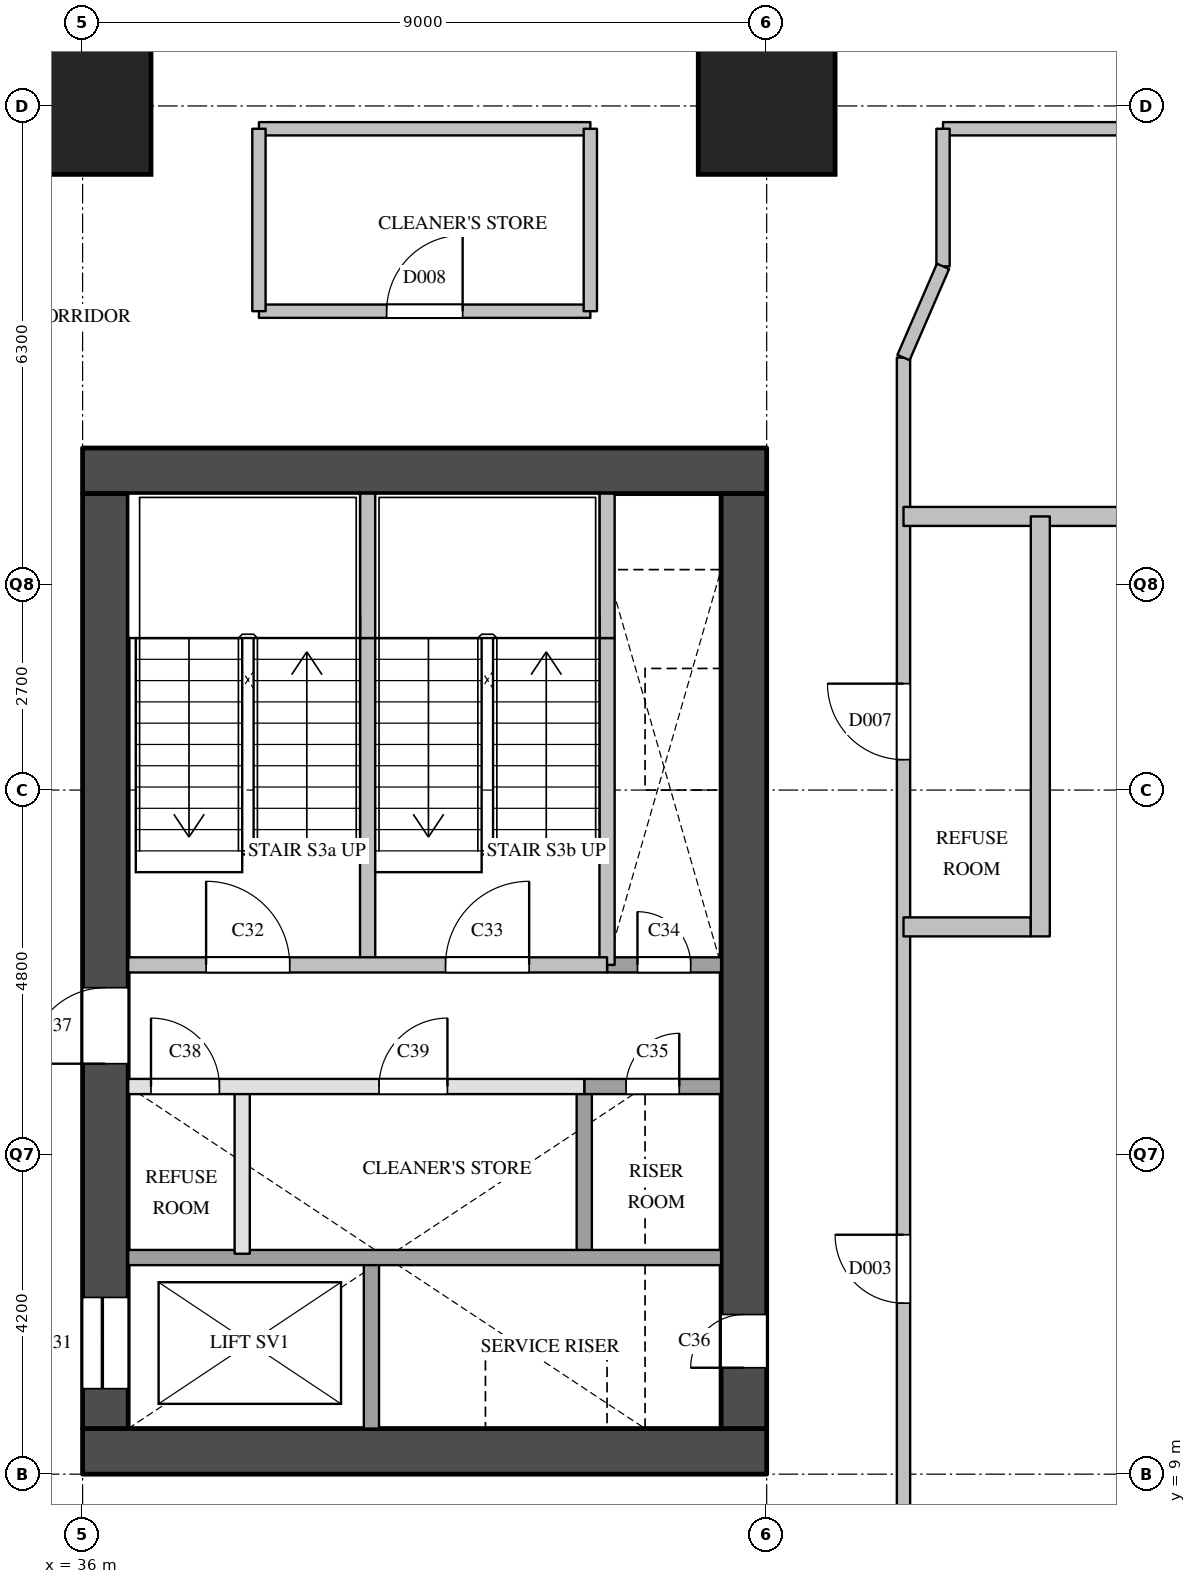
"""IFC4 building model, lengths in metres.
Left out: names, types, materials, properties, quantities, classifications, styles, units other than length and angle.
Written with IfcOpenShell. Run it as: python <this file> out.ifc"""

import sys

from ifc_helpers import new_model, si_unit, direction, frame, frame_2d, origin, origin_2d, place, context, subcontext, project, spatial, rectangle, extrude, element, fill, save


model = new_model("IFC4")
c1 = context("Model", 3, precision=1e-05, world=origin(), true_north=direction((0.0, 1.0)))
c2 = subcontext(c1, "Body", "Model", "MODEL_VIEW")
j1 = project(units=[si_unit("LENGTHUNIT", "METRE"), si_unit("PLANEANGLEUNIT", "RADIAN")], contexts=[c1])
p1 = place(None, origin())
s1 = spatial("IfcSite", under=j1, at=p1, CompositionType="ELEMENT")
p2 = place(p1, origin())
s2 = spatial("IfcBuilding", under=s1, at=p2, CompositionType="ELEMENT")
p3 = place(p2, frame((0.0, 0.0, 89.2)))
s3 = spatial("IfcBuildingStorey", under=s2, at=p3, CompositionType="ELEMENT", Elevation=89.2)
for number, where, z_axis, x_axis in (
    (1, (36.0, 27.0, 0.0), (0.0, 0.0, 1.0), (1.0, 0.0, 0.0)),
    (2, (45.0, 27.0, 0.0), (0.0, 0.0, 1.0), (1.0, 0.0, 0.0)),
):
    element("IfcColumn", number, at=place(p3, frame(where, z_axis=z_axis, x_axis=x_axis)), inside=s3, PredefinedType="COLUMN", context=c2, shape_type="SweptSolid", body=[
        extrude(rectangle(XDim=1.8, YDim=1.8, at=origin_2d()), origin(), (0.0, 0.0, 1.0), 3.8),
    ])
for number, where, z_axis, x_axis in (
    (3, (36.0, 9.3, 0.0), (0.0, 0.0, 1.0), (1.0, 0.0, 0.0)),
    (4, (36.0, 22.2, 0.0), (0.0, 0.0, 1.0), (1.0, 0.0, 0.0)),
):
    element("IfcWall", number, at=place(p3, frame(where, z_axis=z_axis, x_axis=x_axis)), inside=s3, PredefinedType="SHEAR", context=c2, shape_type="SweptSolid", body=[
        extrude(rectangle(XDim=9.0, YDim=0.6, at=frame_2d((4.5, 0.0))), origin(), (0.0, 0.0, 1.0), 3.5),
    ])
p4 = place(p3, frame((36.3, 9.6, 0.0), z_axis=(0.0, 0.0, 1.0), x_axis=(0.0, 1.0, 0.0)))
e5 = element("IfcWall", 5, at=p4, inside=s3, PredefinedType="SHEAR", context=c2, shape_type="SweptSolid", body=[
    extrude(rectangle(XDim=12.3, YDim=0.6, at=frame_2d((6.15, 0.0))), origin(), (0.0, 0.0, 1.0), 3.5),
])
p5 = place(p4, frame((0.525, 0.0, 0.0)))
e6 = element("IfcOpeningElement", 6, at=p5, cuts=e5, PredefinedType="OPENING", context=c2, shape_type="SweptSolid", body=[
    extrude(rectangle(XDim=1.2, YDim=2.1, at=frame_2d((0.6, 1.05))), frame((0.0, 0.31, 0.0), z_axis=(0.0, -1.0, 0.0), x_axis=(1.0, 0.0, 0.0)), (0.0, 0.0, 1.0), 0.62),
])
p6 = place(p4, frame((4.8, 0.0, 0.0)))
e7 = element("IfcOpeningElement", 7, at=p6, cuts=e5, PredefinedType="OPENING", context=c2, shape_type="SweptSolid", body=[
    extrude(rectangle(XDim=1.0, YDim=2.1, at=frame_2d((0.5, 1.05))), frame((0.0, 0.31, 0.0), z_axis=(0.0, -1.0, 0.0), x_axis=(1.0, 0.0, 0.0)), (0.0, 0.0, 1.0), 0.62),
])
p7 = place(p3, frame((44.7, 9.6, 0.0), z_axis=(0.0, 0.0, 1.0), x_axis=(0.0, 1.0, 0.0)))
e8 = element("IfcWall", 8, at=p7, inside=s3, PredefinedType="SHEAR", context=c2, shape_type="SweptSolid", body=[
    extrude(rectangle(XDim=12.3, YDim=0.6, at=frame_2d((6.15, 0.0))), origin(), (0.0, 0.0, 1.0), 3.5),
])
p8 = place(p7, frame((0.8, 0.0, 0.0)))
e9 = element("IfcOpeningElement", 9, at=p8, cuts=e8, PredefinedType="OPENING", context=c2, shape_type="SweptSolid", body=[
    extrude(rectangle(XDim=0.7, YDim=2.1, at=frame_2d((0.35, 1.05))), frame((0.0, 0.31, 0.0), z_axis=(0.0, -1.0, 0.0), x_axis=(1.0, 0.0, 0.0)), (0.0, 0.0, 1.0), 0.62),
])
p9 = place(p3, frame((38.1, 11.9, 0.0), z_axis=(0.0, 0.0, 1.0), x_axis=(0.0, 1.0, 0.0)))
e10 = element("IfcWall", 10, at=p9, inside=s3, PredefinedType="PARTITIONING", context=c2, shape_type="SweptSolid", body=[
    extrude(rectangle(XDim=2.2, YDim=0.2, at=frame_2d((1.1, 0.0))), origin(), (0.0, 0.0, 1.0), 3.5),
])
p10 = place(p3, frame((39.75, 15.7, 0.0), z_axis=(0.0, 0.0, 1.0), x_axis=(0.0, 1.0, 0.0)))
e11 = element("IfcWall", 11, at=p10, inside=s3, PredefinedType="SOLIDWALL", context=c2, shape_type="SweptSolid", body=[
    extrude(rectangle(XDim=4.3, YDim=0.2, at=frame_2d((2.15, 0.0))), origin(), (0.0, 0.0, 1.0), 3.5),
])
p11 = place(p3, frame((39.75, 20.0, 0.0), z_axis=(0.0, 0.0, 1.0), x_axis=(0.0, 1.0, 0.0)))
e12 = element("IfcWall", 12, at=p11, inside=s3, PredefinedType="SOLIDWALL", context=c2, shape_type="SweptSolid", body=[
    extrude(rectangle(XDim=1.9, YDim=0.2, at=frame_2d((0.95, 0.0))), origin(), (0.0, 0.0, 1.0), 3.5),
])
p12 = place(p3, frame((39.8, 9.6, 0.0), z_axis=(0.0, 0.0, 1.0), x_axis=(0.0, 1.0, 0.0)))
e13 = element("IfcWall", 13, at=p12, inside=s3, PredefinedType="SOLIDWALL", context=c2, shape_type="SweptSolid", body=[
    extrude(rectangle(XDim=2.3, YDim=0.2, at=frame_2d((1.15, 0.0))), origin(), (0.0, 0.0, 1.0), 3.5),
])
p13 = place(p3, frame((42.6, 11.9, 0.0), z_axis=(0.0, 0.0, 1.0), x_axis=(0.0, 1.0, 0.0)))
e14 = element("IfcWall", 14, at=p13, inside=s3, PredefinedType="SOLIDWALL", context=c2, shape_type="SweptSolid", body=[
    extrude(rectangle(XDim=2.2, YDim=0.2, at=frame_2d((1.1, 0.0))), origin(), (0.0, 0.0, 1.0), 3.5),
])
p14 = place(p3, frame((42.9, 15.7, 0.0), z_axis=(0.0, 0.0, 1.0), x_axis=(0.0, 1.0, 0.0)))
e15 = element("IfcWall", 15, at=p14, inside=s3, PredefinedType="SOLIDWALL", context=c2, shape_type="SweptSolid", body=[
    extrude(rectangle(XDim=4.3, YDim=0.2, at=frame_2d((2.15, 0.0))), origin(), (0.0, 0.0, 1.0), 3.5),
])
p15 = place(p3, frame((42.9, 20.0, 0.0), z_axis=(0.0, 0.0, 1.0), x_axis=(0.0, 1.0, 0.0)))
e16 = element("IfcWall", 16, at=p15, inside=s3, PredefinedType="SOLIDWALL", context=c2, shape_type="SweptSolid", body=[
    extrude(rectangle(XDim=1.9, YDim=0.2, at=frame_2d((0.95, 0.0))), origin(), (0.0, 0.0, 1.0), 3.5),
])
p16 = place(p3, frame((36.6, 11.85, 0.0), z_axis=(0.0, 0.0, 1.0), x_axis=(1.0, 0.0, 0.0)))
e17 = element("IfcWall", 17, at=p16, inside=s3, PredefinedType="SOLIDWALL", context=c2, shape_type="SweptSolid", body=[
    extrude(rectangle(XDim=7.8, YDim=0.2, at=frame_2d((3.9, 0.0))), origin(), (0.0, 0.0, 1.0), 3.5),
])
p17 = place(p3, frame((36.6, 14.1, 0.0), z_axis=(0.0, 0.0, 1.0), x_axis=(1.0, 0.0, 0.0)))
e18 = element("IfcWall", 18, at=p17, inside=s3, PredefinedType="PARTITIONING", context=c2, shape_type="SweptSolid", body=[
    extrude(rectangle(XDim=6.0, YDim=0.2, at=frame_2d((3.0, 0.0))), origin(), (0.0, 0.0, 1.0), 3.5),
])
p18 = place(p17, frame((0.3, 0.0, 0.0)))
e19 = element("IfcOpeningElement", 19, at=p18, cuts=e18, PredefinedType="OPENING", context=c2, shape_type="SweptSolid", body=[
    extrude(rectangle(XDim=0.9, YDim=2.1, at=frame_2d((0.45, 1.05))), frame((0.0, 0.11, 0.0), z_axis=(0.0, -1.0, 0.0), x_axis=(1.0, 0.0, 0.0)), (0.0, 0.0, 1.0), 0.22),
])
p19 = place(p17, frame((3.3, 0.0, 0.0)))
e20 = element("IfcOpeningElement", 20, at=p19, cuts=e18, PredefinedType="OPENING", context=c2, shape_type="SweptSolid", body=[
    extrude(rectangle(XDim=0.9, YDim=2.1, at=frame_2d((0.45, 1.05))), frame((0.0, 0.11, 0.0), z_axis=(0.0, -1.0, 0.0), x_axis=(1.0, 0.0, 0.0)), (0.0, 0.0, 1.0), 0.22),
])
p20 = place(p3, frame((42.6, 14.1, 0.0), z_axis=(0.0, 0.0, 1.0), x_axis=(1.0, 0.0, 0.0)))
e21 = element("IfcWall", 21, at=p20, inside=s3, PredefinedType="SOLIDWALL", context=c2, shape_type="SweptSolid", body=[
    extrude(rectangle(XDim=1.8, YDim=0.2, at=frame_2d((0.9, 0.0))), origin(), (0.0, 0.0, 1.0), 3.5),
])
p21 = place(p20, frame((0.55, 0.0, 0.0)))
e22 = element("IfcOpeningElement", 22, at=p21, cuts=e21, PredefinedType="OPENING", context=c2, shape_type="SweptSolid", body=[
    extrude(rectangle(XDim=0.7, YDim=2.1, at=frame_2d((0.35, 1.05))), frame((0.0, 0.11, 0.0), z_axis=(0.0, -1.0, 0.0), x_axis=(1.0, 0.0, 0.0)), (0.0, 0.0, 1.0), 0.22),
])
p22 = place(p3, frame((42.9, 15.7, 0.0), z_axis=(0.0, 0.0, 1.0), x_axis=(1.0, 0.0, 0.0)))
e23 = element("IfcWall", 23, at=p22, inside=s3, PredefinedType="SOLIDWALL", context=c2, shape_type="SweptSolid", body=[
    extrude(rectangle(XDim=1.5, YDim=0.2, at=frame_2d((0.75, 0.0))), origin(), (0.0, 0.0, 1.0), 3.5),
])
p23 = place(p22, frame((0.4, 0.0, 0.0)))
e24 = element("IfcOpeningElement", 24, at=p23, cuts=e23, PredefinedType="OPENING", context=c2, shape_type="SweptSolid", body=[
    extrude(rectangle(XDim=0.7, YDim=2.1, at=frame_2d((0.35, 1.05))), frame((0.0, 0.11, 0.0), z_axis=(0.0, -1.0, 0.0), x_axis=(1.0, 0.0, 0.0)), (0.0, 0.0, 1.0), 0.22),
])
p24 = place(p3, frame((36.6, 15.7, 0.0), z_axis=(0.0, 0.0, 1.0), x_axis=(1.0, 0.0, 0.0)))
e25 = element("IfcWall", 25, at=p24, inside=s3, PredefinedType="SOLIDWALL", context=c2, shape_type="SweptSolid", body=[
    extrude(rectangle(XDim=6.3, YDim=0.2, at=frame_2d((3.15, 0.0))), origin(), (0.0, 0.0, 1.0), 3.5),
])
p25 = place(p24, frame((1.025, 0.0, 0.0)))
e26 = element("IfcOpeningElement", 26, at=p25, cuts=e25, PredefinedType="OPENING", context=c2, shape_type="SweptSolid", body=[
    extrude(rectangle(XDim=1.1, YDim=2.1, at=frame_2d((0.55, 1.05))), frame((0.0, 0.11, 0.0), z_axis=(0.0, -1.0, 0.0), x_axis=(1.0, 0.0, 0.0)), (0.0, 0.0, 1.0), 0.22),
])
p26 = place(p24, frame((4.175, 0.0, 0.0)))
e27 = element("IfcOpeningElement", 27, at=p26, cuts=e25, PredefinedType="OPENING", context=c2, shape_type="SweptSolid", body=[
    extrude(rectangle(XDim=1.1, YDim=2.1, at=frame_2d((0.55, 1.05))), frame((0.0, 0.11, 0.0), z_axis=(0.0, -1.0, 0.0), x_axis=(1.0, 0.0, 0.0)), (0.0, 0.0, 1.0), 0.22),
])
p27 = place(p3, frame((38.32, 24.3, 0.0), z_axis=(0.0, 0.0, 1.0), x_axis=(1.0, 0.0, 0.0)))
e28 = element("IfcWall", 28, at=p27, inside=s3, PredefinedType="PARTITIONING", context=c2, shape_type="SweptSolid", body=[
    extrude(rectangle(XDim=4.36, YDim=0.175, at=frame_2d((2.18, 0.0))), origin(), (0.0, 0.0, 1.0), 3.5),
])
p28 = place(p27, frame((1.68, 0.0, 0.0)))
e29 = element("IfcOpeningElement", 29, at=p28, cuts=e28, PredefinedType="OPENING", context=c2, shape_type="SweptSolid", body=[
    extrude(rectangle(XDim=1.0, YDim=2.1, at=frame_2d((0.5, 1.05))), frame((0.0, 0.097, 0.0), z_axis=(0.0, -1.0, 0.0), x_axis=(1.0, 0.0, 0.0)), (0.0, 0.0, 1.0), 0.195),
])
p29 = place(p3, frame((38.32, 26.7, 0.0), z_axis=(0.0, 0.0, 1.0), x_axis=(1.0, 0.0, 0.0)))
e30 = element("IfcWall", 30, at=p29, inside=s3, PredefinedType="PARTITIONING", context=c2, shape_type="SweptSolid", body=[
    extrude(rectangle(XDim=4.36, YDim=0.175, at=frame_2d((2.18, 0.0))), origin(), (0.0, 0.0, 1.0), 2.5),
])
p30 = place(p3, frame((47.32, 26.7, 0.0), z_axis=(0.0, 0.0, 1.0), x_axis=(1.0, 0.0, 0.0)))
e31 = element("IfcWall", 31, at=p30, inside=s3, PredefinedType="PARTITIONING", context=c2, shape_type="SweptSolid", body=[
    extrude(rectangle(XDim=2.88, YDim=0.175, at=frame_2d((1.44, 0.0))), origin(), (0.0, 0.0, 1.0), 2.5),
])
for number, where, z_axis, x_axis in (
    (32, (38.32, 24.3, 0.0), (0.0, 0.0, 1.0), (0.0, 1.0, 0.0)),
    (33, (42.68, 24.3, 0.0), (0.0, 0.0, 1.0), (0.0, 1.0, 0.0)),
):
    element("IfcWall", number, at=place(p3, frame(where, z_axis=z_axis, x_axis=x_axis)), inside=s3, PredefinedType="PARTITIONING", context=c2, shape_type="SweptSolid", body=[
        extrude(rectangle(XDim=2.4, YDim=0.175, at=frame_2d((1.2, 0.0))), origin(), (0.0, 0.0, 1.0), 2.5),
    ])
p31 = place(p3, frame((46.8, 7.2, 0.0), z_axis=(0.0, 0.0, 1.0), x_axis=(0.0, 1.0, 0.0)))
e34 = element("IfcWall", 34, at=p31, inside=s3, PredefinedType="PARTITIONING", context=c2, shape_type="SweptSolid", body=[
    extrude(rectangle(XDim=16.49, YDim=0.175, at=frame_2d((8.245, 0.0))), origin(), (0.0, 0.0, 1.0), 3.5),
])
p32 = place(p31, frame((4.05, 0.0, 0.0)))
e35 = element("IfcOpeningElement", 35, at=p32, cuts=e34, PredefinedType="OPENING", context=c2, shape_type="SweptSolid", body=[
    extrude(rectangle(XDim=0.9, YDim=2.1, at=frame_2d((0.45, 1.05))), frame((0.0, 0.097, 0.0), z_axis=(0.0, -1.0, 0.0), x_axis=(1.0, 0.0, 0.0)), (0.0, 0.0, 1.0), 0.195),
])
p33 = place(p31, frame((11.2, 0.0, 0.0)))
e36 = element("IfcOpeningElement", 36, at=p33, cuts=e34, PredefinedType="OPENING", context=c2, shape_type="SweptSolid", body=[
    extrude(rectangle(XDim=1.0, YDim=2.1, at=frame_2d((0.5, 1.05))), frame((0.0, 0.097, 0.0), z_axis=(0.0, -1.0, 0.0), x_axis=(1.0, 0.0, 0.0)), (0.0, 0.0, 1.0), 0.195),
])
p34 = place(p3, frame((47.32, 24.89, 0.0), z_axis=(0.0, 0.0, 1.0), x_axis=(0.0, 1.0, 0.0)))
e37 = element("IfcWall", 37, at=p34, inside=s3, PredefinedType="PARTITIONING", context=c2, shape_type="SweptSolid", body=[
    extrude(rectangle(XDim=1.81, YDim=0.175, at=frame_2d((0.905, 0.0))), origin(), (0.0, 0.0, 1.0), 2.5),
])
p35 = place(p3, frame((46.8, 16.2, 0.0), z_axis=(0.0, 0.0, 1.0), x_axis=(1.0, 0.0, 0.0)))
e38 = element("IfcWall", 38, at=p35, inside=s3, PredefinedType="PARTITIONING", context=c2, shape_type="SweptSolid", body=[
    extrude(rectangle(XDim=1.675, YDim=0.25, at=frame_2d((0.837, 0.0))), origin(), (0.0, 0.0, 1.0), 3.5),
])
p36 = place(p3, frame((46.8, 21.6, 0.0), z_axis=(0.0, 0.0, 1.0), x_axis=(1.0, 0.0, 0.0)))
e39 = element("IfcWall", 39, at=p36, inside=s3, PredefinedType="PARTITIONING", context=c2, shape_type="SweptSolid", body=[
    extrude(rectangle(XDim=7.2, YDim=0.25, at=frame_2d((3.6, 0.0))), origin(), (0.0, 0.0, 1.0), 2.5),
])
p37 = place(p3, frame((48.6, 16.075, 0.0), z_axis=(0.0, 0.0, 1.0), x_axis=(0.0, 1.0, 0.0)))
e40 = element("IfcWall", 40, at=p37, inside=s3, PredefinedType="PARTITIONING", context=c2, shape_type="SweptSolid", body=[
    extrude(rectangle(XDim=5.525, YDim=0.25, at=frame_2d((2.763, 0.0))), origin(), (0.0, 0.0, 1.0), 3.5),
])
p38 = place(p3, frame((47.32, 24.89, 0.0), z_axis=(0.0, 0.0, 1.0), x_axis=(-0.397633632391, -0.917544273804, 0.0)))
e41 = element("IfcWall", 41, at=p38, inside=s3, PredefinedType="PARTITIONING", context=c2, shape_type="SweptSolid", body=[
    extrude(rectangle(XDim=1.308, YDim=0.175, at=frame_2d((0.654, 0.0))), origin(), (0.0, 0.0, 1.0), 3.5),
])
p39 = place(p5, origin())
e42 = element("IfcDoor", 42, at=p39, inside=s3, OperationType="SLIDING_TO_LEFT", PredefinedType="DOOR", context=c2, shape_type="SweptSolid", body=[
    extrude(rectangle(XDim=1.2, YDim=2.1, at=frame_2d((0.6, 1.05))), frame((0.0, 0.025, 0.0), z_axis=(0.0, -1.0, 0.0), x_axis=(1.0, 0.0, 0.0)), (0.0, 0.0, 1.0), 0.05),
])
fill(e6, e42)
p40 = place(p25, origin())
e43 = element("IfcDoor", 43, at=p40, inside=s3, OperationType="SINGLE_SWING_LEFT", PredefinedType="DOOR", context=c2, shape_type="SweptSolid", body=[
    extrude(rectangle(XDim=1.1, YDim=2.1, at=frame_2d((0.55, 1.05))), frame((0.0, 0.025, 0.0), z_axis=(0.0, -1.0, 0.0), x_axis=(1.0, 0.0, 0.0)), (0.0, 0.0, 1.0), 0.05),
])
fill(e26, e43)
p41 = place(p26, origin())
e44 = element("IfcDoor", 44, at=p41, inside=s3, OperationType="SINGLE_SWING_RIGHT", PredefinedType="DOOR", context=c2, shape_type="SweptSolid", body=[
    extrude(rectangle(XDim=1.1, YDim=2.1, at=frame_2d((0.55, 1.05))), frame((0.0, 0.025, 0.0), z_axis=(0.0, -1.0, 0.0), x_axis=(1.0, 0.0, 0.0)), (0.0, 0.0, 1.0), 0.05),
])
fill(e27, e44)
p42 = place(p23, origin())
e45 = element("IfcDoor", 45, at=p42, inside=s3, OperationType="SINGLE_SWING_LEFT", PredefinedType="DOOR", context=c2, shape_type="SweptSolid", body=[
    extrude(rectangle(XDim=0.7, YDim=2.1, at=frame_2d((0.35, 1.05))), frame((0.0, 0.025, 0.0), z_axis=(0.0, -1.0, 0.0), x_axis=(1.0, 0.0, 0.0)), (0.0, 0.0, 1.0), 0.05),
])
fill(e24, e45)
p43 = place(p21, origin())
e46 = element("IfcDoor", 46, at=p43, inside=s3, OperationType="SINGLE_SWING_RIGHT", PredefinedType="DOOR", context=c2, shape_type="SweptSolid", body=[
    extrude(rectangle(XDim=0.7, YDim=2.1, at=frame_2d((0.35, 1.05))), frame((0.0, 0.025, 0.0), z_axis=(0.0, -1.0, 0.0), x_axis=(1.0, 0.0, 0.0)), (0.0, 0.0, 1.0), 0.05),
])
fill(e22, e46)
p44 = place(p8, origin())
e47 = element("IfcDoor", 47, at=p44, inside=s3, OperationType="SINGLE_SWING_LEFT", PredefinedType="DOOR", context=c2, shape_type="SweptSolid", body=[
    extrude(rectangle(XDim=0.7, YDim=2.1, at=frame_2d((0.35, 1.05))), frame((0.0, 0.025, 0.0), z_axis=(0.0, -1.0, 0.0), x_axis=(1.0, 0.0, 0.0)), (0.0, 0.0, 1.0), 0.05),
])
fill(e9, e47)
p45 = place(p6, origin())
e48 = element("IfcDoor", 48, at=p45, inside=s3, OperationType="SINGLE_SWING_LEFT", PredefinedType="DOOR", context=c2, shape_type="SweptSolid", body=[
    extrude(rectangle(XDim=1.0, YDim=2.1, at=frame_2d((0.5, 1.05))), frame((0.0, 0.025, 0.0), z_axis=(0.0, -1.0, 0.0), x_axis=(1.0, 0.0, 0.0)), (0.0, 0.0, 1.0), 0.05),
])
fill(e7, e48)
p46 = place(p18, origin())
e49 = element("IfcDoor", 49, at=p46, inside=s3, OperationType="SINGLE_SWING_LEFT", PredefinedType="DOOR", context=c2, shape_type="SweptSolid", body=[
    extrude(rectangle(XDim=0.9, YDim=2.1, at=frame_2d((0.45, 1.05))), frame((0.0, 0.025, 0.0), z_axis=(0.0, -1.0, 0.0), x_axis=(1.0, 0.0, 0.0)), (0.0, 0.0, 1.0), 0.05),
])
fill(e19, e49)
p47 = place(p19, origin())
e50 = element("IfcDoor", 50, at=p47, inside=s3, OperationType="SINGLE_SWING_RIGHT", PredefinedType="DOOR", context=c2, shape_type="SweptSolid", body=[
    extrude(rectangle(XDim=0.9, YDim=2.1, at=frame_2d((0.45, 1.05))), frame((0.0, 0.025, 0.0), z_axis=(0.0, -1.0, 0.0), x_axis=(1.0, 0.0, 0.0)), (0.0, 0.0, 1.0), 0.05),
])
fill(e20, e50)
p48 = place(p32, origin())
e51 = element("IfcDoor", 51, at=p48, inside=s3, OperationType="SINGLE_SWING_RIGHT", PredefinedType="DOOR", context=c2, shape_type="SweptSolid", body=[
    extrude(rectangle(XDim=0.9, YDim=2.1, at=frame_2d((0.45, 1.05))), frame((0.0, 0.025, 0.0), z_axis=(0.0, -1.0, 0.0), x_axis=(1.0, 0.0, 0.0)), (0.0, 0.0, 1.0), 0.05),
])
fill(e35, e51)
p49 = place(p33, origin())
e52 = element("IfcDoor", 52, at=p49, inside=s3, OperationType="SINGLE_SWING_RIGHT", PredefinedType="DOOR", context=c2, shape_type="SweptSolid", body=[
    extrude(rectangle(XDim=1.0, YDim=2.1, at=frame_2d((0.5, 1.05))), frame((0.0, 0.025, 0.0), z_axis=(0.0, -1.0, 0.0), x_axis=(1.0, 0.0, 0.0)), (0.0, 0.0, 1.0), 0.05),
])
fill(e36, e52)
p50 = place(p28, origin())
e53 = element("IfcDoor", 53, at=p50, inside=s3, OperationType="SINGLE_SWING_RIGHT", PredefinedType="DOOR", context=c2, shape_type="SweptSolid", body=[
    extrude(rectangle(XDim=1.0, YDim=2.1, at=frame_2d((0.5, 1.05))), frame((0.0, 0.025, 0.0), z_axis=(0.0, -1.0, 0.0), x_axis=(1.0, 0.0, 0.0)), (0.0, 0.0, 1.0), 0.05),
])
fill(e29, e53)
save(model, sys.argv[1])
